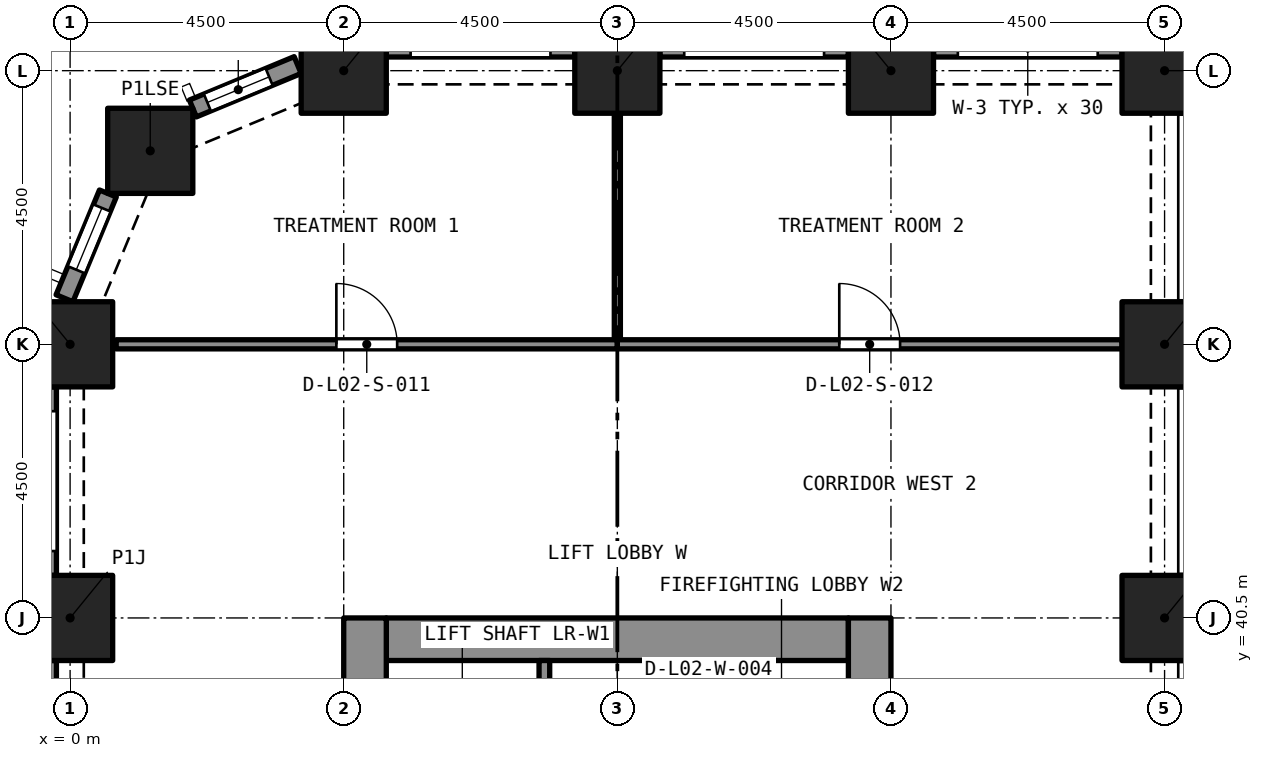
"""IFC4 building model, lengths in metres.
Left out: names, types, materials, properties, quantities, classifications, styles, units other than length and angle.
Written with IfcOpenShell. Run it as: python <this file> out.ifc"""

import sys

from ifc_helpers import new_model, si_unit, direction, frame, frame_2d, origin, origin_2d, place, context, subcontext, project, spatial, rectangle, extrude, element, fill, save


model = new_model("IFC4")
c1 = context("Model", 3, precision=1e-05, world=origin(), true_north=direction((0.0, 1.0)))
c2 = subcontext(c1, "Body", "Model", "MODEL_VIEW")
j1 = project(units=[si_unit("LENGTHUNIT", "METRE"), si_unit("PLANEANGLEUNIT", "RADIAN")], contexts=[c1])
p1 = place(None, origin())
s1 = spatial("IfcSite", under=j1, at=p1, CompositionType="ELEMENT")
p2 = place(p1, origin())
s2 = spatial("IfcBuilding", under=s1, at=p2, CompositionType="ELEMENT")
p3 = place(p2, frame((0.0, 0.0, 11.0)))
s3 = spatial("IfcBuildingStorey", under=s2, at=p3, CompositionType="ELEMENT", Elevation=11.0)
for number, where, z_axis, x_axis in (
    (1, (0.0, 40.5, 0.0), (0.0, 0.0, 1.0), (1.0, 0.0, 0.0)),
    (2, (18.0, 40.5, 0.0), (0.0, 0.0, 1.0), (1.0, 0.0, 0.0)),
    (3, (0.0, 45.0, 0.0), (0.0, 0.0, 1.0), (1.0, 0.0, 0.0)),
    (4, (18.0, 45.0, 0.0), (0.0, 0.0, 1.0), (1.0, 0.0, 0.0)),
    (5, (1.318, 48.182, 0.0), (0.0, 0.0, 1.0), (1.0, 0.0, 0.0)),
    (6, (4.5, 49.5, 0.0), (0.0, 0.0, 1.0), (1.0, 0.0, 0.0)),
    (7, (9.0, 49.5, 0.0), (0.0, 0.0, 1.0), (1.0, 0.0, 0.0)),
    (8, (13.5, 49.5, 0.0), (0.0, 0.0, 1.0), (1.0, 0.0, 0.0)),
    (9, (18.0, 49.5, 0.0), (0.0, 0.0, 1.0), (1.0, 0.0, 0.0)),
):
    element("IfcColumn", number, at=place(p3, frame(where, z_axis=z_axis, x_axis=x_axis)), inside=s3, PredefinedType="COLUMN", context=c2, shape_type="SweptSolid", body=[
        extrude(rectangle(XDim=1.4, YDim=1.4, at=origin_2d()), origin(), (0.0, 0.0, 1.0), 5.0),
    ])
p4 = place(p3, frame((5.2, 40.15, 0.0), z_axis=(0.0, 0.0, 1.0), x_axis=(1.0, 0.0, 0.0)))
e10 = element("IfcWall", 10, at=p4, inside=s3, PredefinedType="SOLIDWALL", context=c2, shape_type="SweptSolid", body=[
    extrude(rectangle(XDim=7.6, YDim=0.7, at=frame_2d((3.8, 0.0))), origin(), (0.0, 0.0, 1.0), 5.0),
])
p5 = place(p3, frame((4.85, 27.0, 0.0), z_axis=(0.0, 0.0, 1.0), x_axis=(0.0, 1.0, 0.0)))
e11 = element("IfcWall", 11, at=p5, inside=s3, PredefinedType="SOLIDWALL", context=c2, shape_type="SweptSolid", body=[
    extrude(rectangle(XDim=13.5, YDim=0.7, at=frame_2d((6.75, 0.0))), origin(), (0.0, 0.0, 1.0), 5.0),
])
p6 = place(p5, frame((8.95, 0.0, 0.0)))
e12 = element("IfcOpeningElement", 12, at=p6, cuts=e11, PredefinedType="OPENING", context=c2, shape_type="SweptSolid", body=[
    extrude(rectangle(XDim=1.2, YDim=2.1, at=frame_2d((0.6, 1.05))), frame((0.0, 0.36, 0.0), z_axis=(0.0, -1.0, 0.0), x_axis=(1.0, 0.0, 0.0)), (0.0, 0.0, 1.0), 0.72),
])
p7 = place(p3, frame((13.15, 27.0, 0.0), z_axis=(0.0, 0.0, 1.0), x_axis=(0.0, 1.0, 0.0)))
e13 = element("IfcWall", 13, at=p7, inside=s3, PredefinedType="SOLIDWALL", context=c2, shape_type="SweptSolid", body=[
    extrude(rectangle(XDim=13.5, YDim=0.7, at=frame_2d((6.75, 0.0))), origin(), (0.0, 0.0, 1.0), 5.0),
])
p8 = place(p7, frame((11.1, 0.0, 0.0)))
e14 = element("IfcOpeningElement", 14, at=p8, cuts=e13, PredefinedType="OPENING", context=c2, shape_type="SweptSolid", body=[
    extrude(rectangle(XDim=1.1, YDim=2.1, at=frame_2d((0.55, 1.05))), frame((0.0, 0.36, 0.0), z_axis=(0.0, -1.0, 0.0), x_axis=(1.0, 0.0, 0.0)), (0.0, 0.0, 1.0), 0.72),
])
p9 = place(p7, frame((8.95, 0.0, 0.0)))
e15 = element("IfcOpeningElement", 15, at=p9, cuts=e13, PredefinedType="OPENING", context=c2, shape_type="SweptSolid", body=[
    extrude(rectangle(XDim=1.2, YDim=2.1, at=frame_2d((0.6, 1.05))), frame((0.0, 0.36, 0.0), z_axis=(0.0, -1.0, 0.0), x_axis=(1.0, 0.0, 0.0)), (0.0, 0.0, 1.0), 0.72),
])
p10 = place(p3, frame((14.2, 49.875, 0.0), z_axis=(0.0, 0.0, 1.0), x_axis=(1.0, 0.0, 0.0)))
e16 = element("IfcWall", 16, at=p10, inside=s3, PredefinedType="SOLIDWALL", context=c2, shape_type="SweptSolid", body=[
    extrude(rectangle(XDim=3.1, YDim=0.3, at=frame_2d((1.55, 0.0))), origin(), (0.0, 0.0, 1.0), 5.0),
])
p11 = place(p10, frame((0.4, 0.0, 0.45)))
e17 = element("IfcOpeningElement", 17, at=p11, cuts=e16, PredefinedType="OPENING", context=c2, shape_type="SweptSolid", body=[
    extrude(rectangle(XDim=2.3, YDim=3.3, at=frame_2d((1.15, 1.65))), frame((0.0, 0.16, 0.0), z_axis=(0.0, -1.0, 0.0), x_axis=(1.0, 0.0, 0.0)), (0.0, 0.0, 1.0), 0.32),
])
p12 = place(p3, frame((9.7, 49.875, 0.0), z_axis=(0.0, 0.0, 1.0), x_axis=(1.0, 0.0, 0.0)))
e18 = element("IfcWall", 18, at=p12, inside=s3, PredefinedType="SOLIDWALL", context=c2, shape_type="SweptSolid", body=[
    extrude(rectangle(XDim=3.1, YDim=0.3, at=frame_2d((1.55, 0.0))), origin(), (0.0, 0.0, 1.0), 5.0),
])
p13 = place(p12, frame((0.4, 0.0, 0.45)))
e19 = element("IfcOpeningElement", 19, at=p13, cuts=e18, PredefinedType="OPENING", context=c2, shape_type="SweptSolid", body=[
    extrude(rectangle(XDim=2.3, YDim=3.3, at=frame_2d((1.15, 1.65))), frame((0.0, 0.16, 0.0), z_axis=(0.0, -1.0, 0.0), x_axis=(1.0, 0.0, 0.0)), (0.0, 0.0, 1.0), 0.32),
])
p14 = place(p3, frame((5.2, 49.875, 0.0), z_axis=(0.0, 0.0, 1.0), x_axis=(1.0, 0.0, 0.0)))
e20 = element("IfcWall", 20, at=p14, inside=s3, PredefinedType="SOLIDWALL", context=c2, shape_type="SweptSolid", body=[
    extrude(rectangle(XDim=3.1, YDim=0.3, at=frame_2d((1.55, 0.0))), origin(), (0.0, 0.0, 1.0), 5.0),
])
p15 = place(p14, frame((0.4, 0.0, 0.45)))
e21 = element("IfcOpeningElement", 21, at=p15, cuts=e20, PredefinedType="OPENING", context=c2, shape_type="SweptSolid", body=[
    extrude(rectangle(XDim=2.3, YDim=3.3, at=frame_2d((1.15, 1.65))), frame((0.0, 0.16, 0.0), z_axis=(0.0, -1.0, 0.0), x_axis=(1.0, 0.0, 0.0)), (0.0, 0.0, 1.0), 0.32),
])
p16 = place(p3, frame((2.02, 48.878, 0.0), z_axis=(0.0, 0.0, 1.0), x_axis=(0.923903565336, 0.38262540684, 0.0)))
e22 = element("IfcWall", 22, at=p16, inside=s3, PredefinedType="SOLIDWALL", context=c2, shape_type="SweptSolid", body=[
    extrude(rectangle(XDim=1.865, YDim=0.3, at=frame_2d((0.933, 0.0))), origin(), (0.0, 0.0, 1.0), 5.0),
])
p17 = place(p16, frame((0.258, 0.0, 0.45)))
e23 = element("IfcOpeningElement", 23, at=p17, cuts=e22, PredefinedType="OPENING", context=c2, shape_type="SweptSolid", body=[
    extrude(rectangle(XDim=1.1, YDim=3.3, at=frame_2d((0.55, 1.65))), frame((0.0, 0.16, 0.0), z_axis=(0.0, -1.0, 0.0), x_axis=(1.0, 0.0, 0.0)), (0.0, 0.0, 1.0), 0.32),
])
p18 = place(p3, frame((-0.092, 45.757, 0.0), z_axis=(0.0, 0.0, 1.0), x_axis=(0.382737135771, 0.923857286003, 0.0)))
e24 = element("IfcWall", 24, at=p18, inside=s3, PredefinedType="SOLIDWALL", context=c2, shape_type="SweptSolid", body=[
    extrude(rectangle(XDim=1.865, YDim=0.3, at=frame_2d((0.933, 0.0))), origin(), (0.0, 0.0, 1.0), 5.0),
])
p19 = place(p18, frame((0.508, 0.0, 0.45)))
e25 = element("IfcOpeningElement", 25, at=p19, cuts=e24, PredefinedType="OPENING", context=c2, shape_type="SweptSolid", body=[
    extrude(rectangle(XDim=1.1, YDim=3.3, at=frame_2d((0.55, 1.65))), frame((0.0, 0.16, 0.0), z_axis=(0.0, -1.0, 0.0), x_axis=(1.0, 0.0, 0.0)), (0.0, 0.0, 1.0), 0.32),
])
p20 = place(p3, frame((-0.375, 41.2, 0.0), z_axis=(0.0, 0.0, 1.0), x_axis=(0.0, 1.0, 0.0)))
e26 = element("IfcWall", 26, at=p20, inside=s3, PredefinedType="SOLIDWALL", context=c2, shape_type="SweptSolid", body=[
    extrude(rectangle(XDim=3.1, YDim=0.3, at=frame_2d((1.55, 0.0))), origin(), (0.0, 0.0, 1.0), 5.0),
])
p21 = place(p20, frame((0.4, 0.0, 0.45)))
e27 = element("IfcOpeningElement", 27, at=p21, cuts=e26, PredefinedType="OPENING", context=c2, shape_type="SweptSolid", body=[
    extrude(rectangle(XDim=2.3, YDim=3.3, at=frame_2d((1.15, 1.65))), frame((0.0, 0.16, 0.0), z_axis=(0.0, -1.0, 0.0), x_axis=(1.0, 0.0, 0.0)), (0.0, 0.0, 1.0), 0.32),
])
p22 = place(p3, frame((-0.375, 36.7, 0.0), z_axis=(0.0, 0.0, 1.0), x_axis=(0.0, 1.0, 0.0)))
e28 = element("IfcWall", 28, at=p22, inside=s3, PredefinedType="SOLIDWALL", context=c2, shape_type="SweptSolid", body=[
    extrude(rectangle(XDim=3.1, YDim=0.3, at=frame_2d((1.55, 0.0))), origin(), (0.0, 0.0, 1.0), 5.0),
])
p23 = place(p22, frame((0.4, 0.0, 0.45)))
e29 = element("IfcOpeningElement", 29, at=p23, cuts=e28, PredefinedType="OPENING", context=c2, shape_type="SweptSolid", body=[
    extrude(rectangle(XDim=2.3, YDim=3.3, at=frame_2d((1.15, 1.65))), frame((0.0, 0.16, 0.0), z_axis=(0.0, -1.0, 0.0), x_axis=(1.0, 0.0, 0.0)), (0.0, 0.0, 1.0), 0.32),
])
p24 = place(p3, frame((7.8, 37.5, 0.0), z_axis=(0.0, 0.0, 1.0), x_axis=(0.0, 1.0, 0.0)))
e30 = element("IfcWall", 30, at=p24, inside=s3, PredefinedType="SOLIDWALL", context=c2, shape_type="SweptSolid", body=[
    extrude(rectangle(XDim=2.3, YDim=0.175, at=frame_2d((1.15, 0.0))), origin(), (0.0, 0.0, 1.0), 4.65),
])
p25 = place(p3, frame((10.5, 37.5, 0.0), z_axis=(0.0, 0.0, 1.0), x_axis=(0.0, 1.0, 0.0)))
e31 = element("IfcWall", 31, at=p25, inside=s3, PredefinedType="SOLIDWALL", context=c2, shape_type="SweptSolid", body=[
    extrude(rectangle(XDim=2.3, YDim=0.175, at=frame_2d((1.15, 0.0))), origin(), (0.0, 0.0, 1.0), 4.65),
])
p26 = place(p25, frame((0.65, 0.0, 0.0)))
e32 = element("IfcOpeningElement", 32, at=p26, cuts=e31, PredefinedType="OPENING", context=c2, shape_type="SweptSolid", body=[
    extrude(rectangle(XDim=1.0, YDim=2.1, at=frame_2d((0.5, 1.05))), frame((0.0, 0.097, 0.0), z_axis=(0.0, -1.0, 0.0), x_axis=(1.0, 0.0, 0.0)), (0.0, 0.0, 1.0), 0.195),
])
p27 = place(p3, frame((9.0, 45.075, 0.0), z_axis=(0.0, 0.0, 1.0), x_axis=(0.0, 1.0, 0.0)))
e33 = element("IfcWall", 33, at=p27, inside=s3, PredefinedType="PARTITIONING", context=c2, shape_type="SweptSolid", body=[
    extrude(rectangle(XDim=3.725, YDim=0.1, at=frame_2d((1.863, 0.0))), origin(), (0.0, 0.0, 1.0), 4.65),
])
p28 = place(p3, frame((0.758, 45.0, 0.0), z_axis=(0.0, 0.0, 1.0), x_axis=(1.0, 0.0, 0.0)))
e34 = element("IfcWall", 34, at=p28, inside=s3, PredefinedType="PARTITIONING", context=c2, shape_type="SweptSolid", body=[
    extrude(rectangle(XDim=8.242, YDim=0.15, at=frame_2d((4.121, 0.0))), origin(), (0.0, 0.0, 1.0), 4.65),
])
p29 = place(p28, frame((3.621, 0.0, 0.0)))
e35 = element("IfcOpeningElement", 35, at=p29, cuts=e34, PredefinedType="OPENING", context=c2, shape_type="SweptSolid", body=[
    extrude(rectangle(XDim=1.0, YDim=2.1, at=frame_2d((0.5, 1.05))), frame((0.0, 0.085, 0.0), z_axis=(0.0, -1.0, 0.0), x_axis=(1.0, 0.0, 0.0)), (0.0, 0.0, 1.0), 0.17),
])
p30 = place(p3, frame((9.0, 45.0, 0.0), z_axis=(0.0, 0.0, 1.0), x_axis=(1.0, 0.0, 0.0)))
e36 = element("IfcWall", 36, at=p30, inside=s3, PredefinedType="PARTITIONING", context=c2, shape_type="SweptSolid", body=[
    extrude(rectangle(XDim=8.3, YDim=0.15, at=frame_2d((4.15, 0.0))), origin(), (0.0, 0.0, 1.0), 4.65),
])
p31 = place(p30, frame((3.65, 0.0, 0.0)))
e37 = element("IfcOpeningElement", 37, at=p31, cuts=e36, PredefinedType="OPENING", context=c2, shape_type="SweptSolid", body=[
    extrude(rectangle(XDim=1.0, YDim=2.1, at=frame_2d((0.5, 1.05))), frame((0.0, 0.085, 0.0), z_axis=(0.0, -1.0, 0.0), x_axis=(1.0, 0.0, 0.0)), (0.0, 0.0, 1.0), 0.17),
])
p32 = place(p17, origin())
e38 = element("IfcWindow", 38, at=p32, inside=s3, PartitioningType="SINGLE_PANEL", PredefinedType="WINDOW", context=c2, shape_type="SweptSolid", body=[
    extrude(rectangle(XDim=1.1, YDim=3.3, at=frame_2d((0.55, 1.65))), frame((0.0, 0.03, 0.0), z_axis=(0.0, -1.0, 0.0), x_axis=(1.0, 0.0, 0.0)), (0.0, 0.0, 1.0), 0.06),
])
fill(e23, e38)
p33 = place(p19, origin())
e39 = element("IfcWindow", 39, at=p33, inside=s3, PartitioningType="SINGLE_PANEL", PredefinedType="WINDOW", context=c2, shape_type="SweptSolid", body=[
    extrude(rectangle(XDim=1.1, YDim=3.3, at=frame_2d((0.55, 1.65))), frame((0.0, 0.03, 0.0), z_axis=(0.0, -1.0, 0.0), x_axis=(1.0, 0.0, 0.0)), (0.0, 0.0, 1.0), 0.06),
])
fill(e25, e39)
p34 = place(p29, origin())
e40 = element("IfcDoor", 40, at=p34, inside=s3, OperationType="SINGLE_SWING_RIGHT", PredefinedType="DOOR", context=c2, shape_type="SweptSolid", body=[
    extrude(rectangle(XDim=1.0, YDim=2.1, at=frame_2d((0.5, 1.05))), frame((0.0, 0.025, 0.0), z_axis=(0.0, -1.0, 0.0), x_axis=(1.0, 0.0, 0.0)), (0.0, 0.0, 1.0), 0.05),
])
fill(e35, e40)
p35 = place(p31, origin())
e41 = element("IfcDoor", 41, at=p35, inside=s3, OperationType="SINGLE_SWING_RIGHT", PredefinedType="DOOR", context=c2, shape_type="SweptSolid", body=[
    extrude(rectangle(XDim=1.0, YDim=2.1, at=frame_2d((0.5, 1.05))), frame((0.0, 0.025, 0.0), z_axis=(0.0, -1.0, 0.0), x_axis=(1.0, 0.0, 0.0)), (0.0, 0.0, 1.0), 0.05),
])
fill(e37, e41)
save(model, sys.argv[1])
